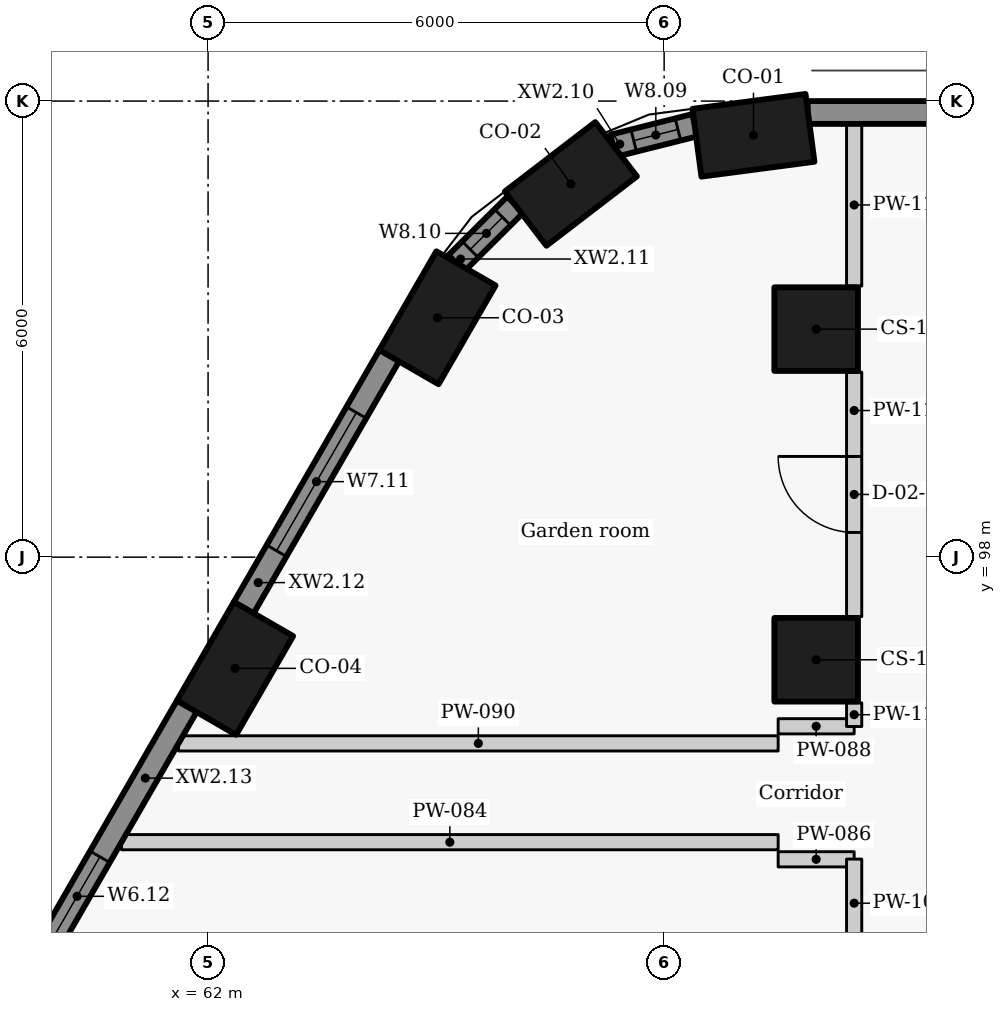
"""IFC4 building model, lengths in metres.
Left out: names, types, materials, properties, quantities, classifications, styles, units other than length and angle.
Written with IfcOpenShell. Run it as: python <this file> out.ifc"""

import sys

from ifc_helpers import new_model, si_unit, direction, frame, frame_2d, origin, origin_2d, place, context, subcontext, project, spatial, rectangle, extrude, element, fill, save


model = new_model("IFC4")
c1 = context("Model", 3, precision=1e-05, world=origin(), true_north=direction((0.0, 1.0)))
c2 = subcontext(c1, "Body", "Model", "MODEL_VIEW")
j1 = project(units=[si_unit("LENGTHUNIT", "METRE"), si_unit("PLANEANGLEUNIT", "RADIAN")], contexts=[c1])
p1 = place(None, origin())
s1 = spatial("IfcSite", under=j1, at=p1, CompositionType="ELEMENT")
p2 = place(p1, origin())
s2 = spatial("IfcBuilding", under=s1, at=p2, CompositionType="ELEMENT")
p3 = place(p2, frame((0.0, 0.0, 61.2)))
s3 = spatial("IfcBuildingStorey", under=s2, at=p3, CompositionType="ELEMENT", Elevation=61.2)
for number, where, z_axis, x_axis in (
    (1, (69.175, 103.55, 0.0), (0.0, 0.0, 1.0), (-0.991, -0.131, 0.0)),
    (2, (66.773, 102.91, 0.0), (0.0, 0.0, 1.0), (-0.793, -0.609, 0.0)),
    (3, (65.018, 101.149, 0.0), (0.0, 0.0, 1.0), (-0.5, -0.866, 0.0)),
    (4, (62.354, 96.537, 0.0), (0.0, 0.0, 1.0), (-0.5, -0.866, 0.0)),
):
    element("IfcColumn", number, at=place(p3, frame(where, z_axis=z_axis, x_axis=x_axis)), inside=s3, PredefinedType="COLUMN", context=c2, shape_type="SweptSolid", body=[
        extrude(rectangle(XDim=1.5, YDim=0.9, at=origin_2d()), origin(), (0.0, 0.0, 1.0), 3.3),
    ])
for number, where, z_axis, x_axis in (
    (5, (70.0, 101.0, 0.0), (0.0, 0.0, 1.0), (0.0, -1.0, 0.0)),
    (6, (70.0, 96.65, 0.0), (0.0, 0.0, 1.0), (0.0, -1.0, 0.0)),
):
    element("IfcColumn", number, at=place(p3, frame(where, z_axis=z_axis, x_axis=x_axis)), inside=s3, PredefinedType="COLUMN", context=c2, shape_type="SweptSolid", body=[
        extrude(rectangle(XDim=1.1, YDim=1.1, at=origin_2d()), origin(), (0.0, 0.0, 1.0), 3.3),
    ])
p4 = place(p3, frame((90.079, 103.85, 0.0), z_axis=(0.0, 0.0, 1.0), x_axis=(-1.0, 0.0, 0.0)))
e7 = element("IfcWall", 7, at=p4, inside=s3, PredefinedType="SOLIDWALL", context=c2, shape_type="SweptSolid", body=[
    extrude(rectangle(XDim=20.19, YDim=0.3, at=frame_2d((10.095, 0.0))), origin(), (0.0, 0.0, 1.0), 2.425),
])
p5 = place(p3, frame((68.405, 103.683, 0.0), z_axis=(0.0, 0.0, 1.0), x_axis=(-0.969766298956, -0.244035500304, 0.0)))
e8 = element("IfcWall", 8, at=p5, inside=s3, PredefinedType="SOLIDWALL", context=c2, shape_type="SweptSolid", body=[
    extrude(rectangle(XDim=1.111, YDim=0.3, at=frame_2d((0.555, 0.0))), origin(), (0.0, 0.0, 1.0), 2.425),
])
p6 = place(p5, frame((0.231, 0.0, 0.9)))
e9 = element("IfcOpeningElement", 9, at=p6, cuts=e8, PredefinedType="OPENING", context=c2, shape_type="SweptSolid", body=[
    extrude(rectangle(XDim=0.6, YDim=1.1, at=frame_2d((0.3, 0.55))), frame((0.0, 0.16, 0.0), z_axis=(0.0, -1.0, 0.0), x_axis=(1.0, 0.0, 0.0)), (0.0, 0.0, 1.0), 0.32),
])
p7 = place(p3, frame((66.042, 102.637, 0.0), z_axis=(0.0, 0.0, 1.0), x_axis=(-0.708892395813, -0.705316646024, 0.0)))
e10 = element("IfcWall", 10, at=p7, inside=s3, PredefinedType="SOLIDWALL", context=c2, shape_type="SweptSolid", body=[
    extrude(rectangle(XDim=1.093, YDim=0.3, at=frame_2d((0.546, 0.0))), origin(), (0.0, 0.0, 1.0), 2.425),
])
p8 = place(p7, frame((0.236, 0.0, 0.9)))
e11 = element("IfcOpeningElement", 11, at=p8, cuts=e10, PredefinedType="OPENING", context=c2, shape_type="SweptSolid", body=[
    extrude(rectangle(XDim=0.6, YDim=1.1, at=frame_2d((0.3, 0.55))), frame((0.0, 0.16, 0.0), z_axis=(0.0, -1.0, 0.0), x_axis=(1.0, 0.0, 0.0)), (0.0, 0.0, 1.0), 0.32),
])
p9 = place(p3, frame((64.385, 100.654, 0.0), z_axis=(0.0, 0.0, 1.0), x_axis=(-0.499974163209, -0.866040320149, 0.0)))
e12 = element("IfcWall", 12, at=p9, inside=s3, PredefinedType="SOLIDWALL", context=c2, shape_type="SweptSolid", body=[
    extrude(rectangle(XDim=3.834, YDim=0.3, at=frame_2d((1.917, 0.0))), origin(), (0.0, 0.0, 1.0), 2.425),
])
p10 = place(p9, frame((0.867, 0.0, 0.9)))
e13 = element("IfcOpeningElement", 13, at=p10, cuts=e12, PredefinedType="OPENING", context=c2, shape_type="SweptSolid", body=[
    extrude(rectangle(XDim=2.1, YDim=1.1, at=frame_2d((1.05, 0.55))), frame((0.0, 0.16, 0.0), z_axis=(0.0, -1.0, 0.0), x_axis=(1.0, 0.0, 0.0)), (0.0, 0.0, 1.0), 0.32),
])
p11 = place(p3, frame((61.722, 96.041, 0.0), z_axis=(0.0, 0.0, 1.0), x_axis=(-0.500001735503, -0.866024401789, 0.0)))
e14 = element("IfcWall", 14, at=p11, inside=s3, PredefinedType="SOLIDWALL", context=c2, shape_type="SweptSolid", body=[
    extrude(rectangle(XDim=3.834, YDim=0.3, at=frame_2d((1.917, 0.0))), origin(), (0.0, 0.0, 1.0), 2.425),
])
p12 = place(p11, frame((2.29, 0.0, 0.9)))
e15 = element("IfcOpeningElement", 15, at=p12, cuts=e14, PredefinedType="OPENING", context=c2, shape_type="SweptSolid", body=[
    extrude(rectangle(XDim=1.2, YDim=1.1, at=frame_2d((0.6, 0.55))), frame((0.0, 0.16, 0.0), z_axis=(0.0, -1.0, 0.0), x_axis=(1.0, 0.0, 0.0)), (0.0, 0.0, 1.0), 0.32),
])
p13 = place(p3, frame((60.861, 94.25, 0.0), z_axis=(0.0, 0.0, 1.0), x_axis=(1.0, 0.0, 0.0)))
e16 = element("IfcWall", 16, at=p13, inside=s3, PredefinedType="PARTITIONING", context=c2, shape_type="SweptSolid", body=[
    extrude(rectangle(XDim=8.639, YDim=0.2, at=frame_2d((4.32, 0.0))), origin(), (0.0, 0.0, 1.0), 2.405),
])
for number, where, z_axis, x_axis in (
    (17, (69.5, 94.025, 0.0), (0.0, 0.0, 1.0), (1.0, 0.0, 0.0)),
    (18, (69.5, 95.775, 0.0), (0.0, 0.0, 1.0), (1.0, 0.0, 0.0)),
):
    element("IfcWall", number, at=place(p3, frame(where, z_axis=z_axis, x_axis=x_axis)), inside=s3, PredefinedType="PARTITIONING", context=c2, shape_type="SweptSolid", body=[
        extrude(rectangle(XDim=1.0, YDim=0.2, at=frame_2d((0.5, 0.0))), origin(), (0.0, 0.0, 1.0), 2.505),
    ])
p14 = place(p3, frame((61.611, 95.55, 0.0), z_axis=(0.0, 0.0, 1.0), x_axis=(1.0, 0.0, 0.0)))
e19 = element("IfcWall", 19, at=p14, inside=s3, PredefinedType="PARTITIONING", context=c2, shape_type="SweptSolid", body=[
    extrude(rectangle(XDim=7.889, YDim=0.2, at=frame_2d((3.944, 0.0))), origin(), (0.0, 0.0, 1.0), 2.405),
])
p15 = place(p3, frame((70.5, 92.867, 0.0), z_axis=(0.0, 0.0, 1.0), x_axis=(0.0, 1.0, 0.0)))
e20 = element("IfcWall", 20, at=p15, inside=s3, PredefinedType="PARTITIONING", context=c2, shape_type="SweptSolid", body=[
    extrude(rectangle(XDim=1.161, YDim=0.2, at=frame_2d((0.581, 0.0))), origin(), (0.0, 0.0, 1.0), 3.025),
])
p16 = place(p3, frame((70.5, 95.772, 0.0), z_axis=(0.0, 0.0, 1.0), x_axis=(0.0, 1.0, 0.0)))
e21 = element("IfcWall", 21, at=p16, inside=s3, PredefinedType="PARTITIONING", context=c2, shape_type="SweptSolid", body=[
    extrude(rectangle(XDim=0.311, YDim=0.2, at=frame_2d((0.156, 0.0))), origin(), (0.0, 0.0, 1.0), 3.025),
])
p17 = place(p3, frame((70.5, 97.217, 0.0), z_axis=(0.0, 0.0, 1.0), x_axis=(0.0, 1.0, 0.0)))
e22 = element("IfcWall", 22, at=p17, inside=s3, PredefinedType="PARTITIONING", context=c2, shape_type="SweptSolid", body=[
    extrude(rectangle(XDim=3.216, YDim=0.2, at=frame_2d((1.608, 0.0))), origin(), (0.0, 0.0, 1.0), 3.025),
])
p18 = place(p17, frame((1.108, 0.0, 0.0)))
e23 = element("IfcOpeningElement", 23, at=p18, cuts=e22, PredefinedType="OPENING", context=c2, shape_type="SweptSolid", body=[
    extrude(rectangle(XDim=1.0, YDim=2.1, at=frame_2d((0.5, 1.05))), frame((0.0, 0.11, 0.0), z_axis=(0.0, -1.0, 0.0), x_axis=(1.0, 0.0, 0.0)), (0.0, 0.0, 1.0), 0.22),
])
p19 = place(p3, frame((70.5, 101.567, 0.0), z_axis=(0.0, 0.0, 1.0), x_axis=(0.0, 1.0, 0.0)))
e24 = element("IfcWall", 24, at=p19, inside=s3, PredefinedType="PARTITIONING", context=c2, shape_type="SweptSolid", body=[
    extrude(rectangle(XDim=2.133, YDim=0.2, at=frame_2d((1.066, 0.0))), origin(), (0.0, 0.0, 1.0), 3.025),
])
p20 = place(p6, origin())
e25 = element("IfcWindow", 25, at=p20, inside=s3, PartitioningType="SINGLE_PANEL", PredefinedType="WINDOW", context=c2, shape_type="SweptSolid", body=[
    extrude(rectangle(XDim=0.6, YDim=1.1, at=frame_2d((0.3, 0.55))), frame((0.0, 0.03, 0.0), z_axis=(0.0, -1.0, 0.0), x_axis=(1.0, 0.0, 0.0)), (0.0, 0.0, 1.0), 0.06),
])
fill(e9, e25)
p21 = place(p8, origin())
e26 = element("IfcWindow", 26, at=p21, inside=s3, PartitioningType="SINGLE_PANEL", PredefinedType="WINDOW", context=c2, shape_type="SweptSolid", body=[
    extrude(rectangle(XDim=0.6, YDim=1.1, at=frame_2d((0.3, 0.55))), frame((0.0, 0.03, 0.0), z_axis=(0.0, -1.0, 0.0), x_axis=(1.0, 0.0, 0.0)), (0.0, 0.0, 1.0), 0.06),
])
fill(e11, e26)
p22 = place(p10, origin())
e27 = element("IfcWindow", 27, at=p22, inside=s3, PartitioningType="SINGLE_PANEL", PredefinedType="WINDOW", context=c2, shape_type="SweptSolid", body=[
    extrude(rectangle(XDim=2.1, YDim=1.1, at=frame_2d((1.05, 0.55))), frame((0.0, 0.03, 0.0), z_axis=(0.0, -1.0, 0.0), x_axis=(1.0, 0.0, 0.0)), (0.0, 0.0, 1.0), 0.06),
])
fill(e13, e27)
p23 = place(p12, origin())
e28 = element("IfcWindow", 28, at=p23, inside=s3, PartitioningType="SINGLE_PANEL", PredefinedType="WINDOW", context=c2, shape_type="SweptSolid", body=[
    extrude(rectangle(XDim=1.2, YDim=1.1, at=frame_2d((0.6, 0.55))), frame((0.0, 0.03, 0.0), z_axis=(0.0, -1.0, 0.0), x_axis=(1.0, 0.0, 0.0)), (0.0, 0.0, 1.0), 0.06),
])
fill(e15, e28)
p24 = place(p18, origin())
e29 = element("IfcDoor", 29, at=p24, inside=s3, OperationType="SINGLE_SWING_RIGHT", PredefinedType="DOOR", context=c2, shape_type="SweptSolid", body=[
    extrude(rectangle(XDim=1.0, YDim=2.1, at=frame_2d((0.5, 1.05))), frame((0.0, 0.025, 0.0), z_axis=(0.0, -1.0, 0.0), x_axis=(1.0, 0.0, 0.0)), (0.0, 0.0, 1.0), 0.05),
])
fill(e23, e29)
save(model, sys.argv[1])
